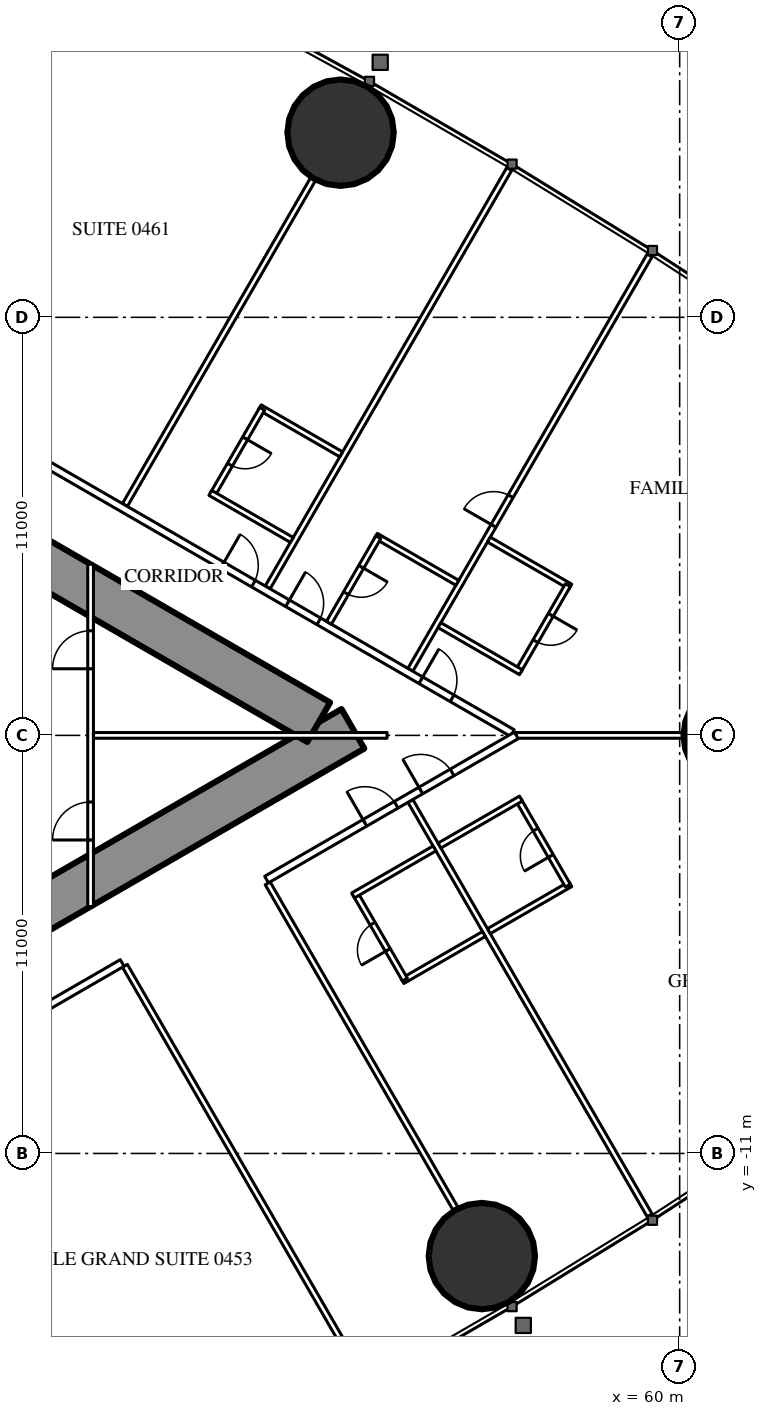
"""IFC4 building model, lengths in metres.
Left out: names, types, materials, properties, quantities, classifications, styles, units other than length and angle.
Written with IfcOpenShell. Run it as: python <this file> out.ifc"""

import sys

from ifc_helpers import new_model, si_unit, direction, frame, frame_2d, origin, origin_2d, place, context, subcontext, project, spatial, rectangle, hollow_circle, extrude, element, fill, save


model = new_model("IFC4")
c1 = context("Model", 3, precision=1e-05, world=origin(), true_north=direction((0.0, 1.0)))
c2 = subcontext(c1, "Body", "Model", "MODEL_VIEW")
j1 = project(units=[si_unit("LENGTHUNIT", "METRE"), si_unit("PLANEANGLEUNIT", "RADIAN")], contexts=[c1])
p1 = place(None, origin())
s1 = spatial("IfcSite", under=j1, at=p1, CompositionType="ELEMENT")
p2 = place(p1, origin())
s2 = spatial("IfcBuilding", under=s1, at=p2, CompositionType="ELEMENT")
p3 = place(p2, frame((0.0, 0.0, 21.5)))
s3 = spatial("IfcBuildingStorey", under=s2, at=p3, CompositionType="ELEMENT", Elevation=21.5)
for number, where, z_axis, x_axis in (
    (1, (51.078, 15.858, 0.0), (0.0, 0.0, 1.0), (1.0, 0.0, 0.0)),
    (2, (54.795, -13.701, 0.0), (0.0, 0.0, 1.0), (1.0, 0.0, 0.0)),
):
    element("IfcColumn", number, at=place(p3, frame(where, z_axis=z_axis, x_axis=x_axis)), inside=s3, PredefinedType="COLUMN", context=c2, shape_type="SweptSolid", body=[
        extrude(hollow_circle(Radius=1.4, WallThickness=0.12, at=origin_2d()), origin(), (0.0, 0.0, 1.0), 3.5),
    ])
p4 = place(p3, frame((61.5, 0.0, 0.0), z_axis=(0.0, 0.0, 1.0), x_axis=(1.0, 0.0, 0.0)))
e3 = element("IfcColumn", 3, at=p4, inside=s3, PredefinedType="COLUMN", context=c2, shape_type="SweptSolid", body=[
    extrude(hollow_circle(Radius=1.4, WallThickness=0.1, at=origin_2d()), origin(), (0.0, 0.0, 1.0), 3.5),
])
p5 = place(p3, frame((27.2, -13.8, 0.0), z_axis=(0.0, 0.0, 1.0), x_axis=(0.866027159892, 0.499996958321, 0.0)))
e4 = element("IfcWall", 4, at=p5, inside=s3, PredefinedType="SHEAR", context=c2, shape_type="SweptSolid", body=[
    extrude(rectangle(XDim=27.947, YDim=1.2, at=frame_2d((13.973, 0.0))), origin(), (0.0, 0.0, 1.0), 3.5),
])
p6 = place(p5, frame((4.6, 0.0, 0.0)))
e5 = element("IfcOpeningElement", 5, at=p6, cuts=e4, PredefinedType="OPENING", context=c2, shape_type="SweptSolid", body=[
    extrude(rectangle(XDim=1.0, YDim=2.2, at=frame_2d((0.5, 1.1))), frame((0.0, 0.61, 0.0), z_axis=(0.0, -1.0, 0.0), x_axis=(1.0, 0.0, 0.0)), (0.0, 0.0, 1.0), 1.22),
])
p7 = place(p5, frame((13.395, 0.0, 0.0)))
e6 = element("IfcOpeningElement", 6, at=p7, cuts=e4, PredefinedType="OPENING", context=c2, shape_type="SweptSolid", body=[
    extrude(rectangle(XDim=1.8, YDim=2.2, at=frame_2d((0.9, 1.1))), frame((0.0, 0.61, 0.0), z_axis=(0.0, -1.0, 0.0), x_axis=(1.0, 0.0, 0.0)), (0.0, 0.0, 1.0), 1.22),
])
p8 = place(p3, frame((27.2, 13.8, 0.0), z_axis=(0.0, 0.0, 1.0), x_axis=(0.866024515034, -0.500001539357, 0.0)))
e7 = element("IfcWall", 7, at=p8, inside=s3, PredefinedType="SHEAR", context=c2, shape_type="SweptSolid", body=[
    extrude(rectangle(XDim=26.907, YDim=1.2, at=frame_2d((13.454, 0.0))), origin(), (0.0, 0.0, 1.0), 3.5),
])
p9 = place(p8, frame((4.6, 0.0, 0.0)))
e8 = element("IfcOpeningElement", 8, at=p9, cuts=e7, PredefinedType="OPENING", context=c2, shape_type="SweptSolid", body=[
    extrude(rectangle(XDim=1.0, YDim=2.2, at=frame_2d((0.5, 1.1))), frame((0.0, 0.61, 0.0), z_axis=(0.0, -1.0, 0.0), x_axis=(1.0, 0.0, 0.0)), (0.0, 0.0, 1.0), 1.22),
])
p10 = place(p8, frame((13.395, 0.0, 0.0)))
e9 = element("IfcOpeningElement", 9, at=p10, cuts=e7, PredefinedType="OPENING", context=c2, shape_type="SweptSolid", body=[
    extrude(rectangle(XDim=1.8, YDim=2.2, at=frame_2d((0.9, 1.1))), frame((0.0, 0.61, 0.0), z_axis=(0.0, -1.0, 0.0), x_axis=(1.0, 0.0, 0.0)), (0.0, 0.0, 1.0), 1.22),
])
p11 = place(p3, frame((45.403, -6.062, 0.0), z_axis=(0.0, 0.0, 1.0), x_axis=(0.500007077968, -0.866021317279, 0.0)))
e10 = element("IfcWall", 10, at=p11, inside=s3, PredefinedType="PARTITIONING", context=c2, shape_type="SweptSolid", body=[
    extrude(rectangle(XDim=12.721, YDim=0.15, at=frame_2d((6.361, 0.0))), origin(), (0.0, 0.0, 1.0), 3.25),
])
p12 = place(p3, frame((49.159, -3.893, 0.0), z_axis=(0.0, 0.0, 1.0), x_axis=(0.499998773722, -0.866026111775, 0.0)))
e11 = element("IfcWall", 11, at=p12, inside=s3, PredefinedType="PARTITIONING", context=c2, shape_type="SweptSolid", body=[
    extrude(rectangle(XDim=9.892, YDim=0.15, at=frame_2d((4.946, 0.0))), origin(), (0.0, 0.0, 1.0), 2.25),
])
p13 = place(p3, frame((52.915, -1.725, 0.0), z_axis=(0.0, 0.0, 1.0), x_axis=(0.499997163113, -0.866027041656, 0.0)))
e12 = element("IfcWall", 12, at=p13, inside=s3, PredefinedType="PARTITIONING", context=c2, shape_type="SweptSolid", body=[
    extrude(rectangle(XDim=12.591, YDim=0.15, at=frame_2d((6.295, 0.0))), origin(), (0.0, 0.0, 1.0), 3.25),
])
p14 = place(p3, frame((45.403, 6.062, 0.0), z_axis=(0.0, 0.0, 1.0), x_axis=(0.500013434677, 0.866017647131, 0.0)))
e13 = element("IfcWall", 13, at=p14, inside=s3, PredefinedType="PARTITIONING", context=c2, shape_type="SweptSolid", body=[
    extrude(rectangle(XDim=9.902, YDim=0.15, at=frame_2d((4.951, 0.0))), origin(), (0.0, 0.0, 1.0), 2.25),
])
p15 = place(p3, frame((49.159, 3.893, 0.0), z_axis=(0.0, 0.0, 1.0), x_axis=(0.499995664361, 0.866027906952, 0.0)))
e14 = element("IfcWall", 14, at=p15, inside=s3, PredefinedType="PARTITIONING", context=c2, shape_type="SweptSolid", body=[
    extrude(rectangle(XDim=12.711, YDim=0.15, at=frame_2d((6.356, 0.0))), origin(), (0.0, 0.0, 1.0), 3.25),
])
p16 = place(p3, frame((52.915, 1.725, 0.0), z_axis=(0.0, 0.0, 1.0), x_axis=(0.499997163113, 0.866027041656, 0.0)))
e15 = element("IfcWall", 15, at=p16, inside=s3, PredefinedType="PARTITIONING", context=c2, shape_type="SweptSolid", body=[
    extrude(rectangle(XDim=12.591, YDim=0.15, at=frame_2d((6.295, 0.0))), origin(), (0.0, 0.0, 1.0), 3.25),
])
p17 = place(p16, frame((4.375, 0.0, 0.0)))
e16 = element("IfcOpeningElement", 16, at=p17, cuts=e15, PredefinedType="OPENING", context=c2, shape_type="SweptSolid", body=[
    extrude(rectangle(XDim=0.9, YDim=2.2, at=frame_2d((0.45, 1.1))), frame((0.0, 0.085, 0.0), z_axis=(0.0, -1.0, 0.0), x_axis=(1.0, 0.0, 0.0)), (0.0, 0.0, 1.0), 0.17),
])
p18 = place(p3, frame((55.702, 0.0, 0.0), z_axis=(0.0, 0.0, 1.0), x_axis=(1.0, 0.0, 0.0)))
e17 = element("IfcWall", 17, at=p18, inside=s3, PredefinedType="PARTITIONING", context=c2, shape_type="SweptSolid", body=[
    extrude(rectangle(XDim=16.117, YDim=0.15, at=frame_2d((8.059, 0.0))), origin(), (0.0, 0.0, 1.0), 2.25),
])
p19 = place(p3, frame((36.834, 10.894, 0.0), z_axis=(0.0, 0.0, 1.0), x_axis=(0.866028157229, -0.499995230863, 0.0)))
e18 = element("IfcWall", 18, at=p19, inside=s3, PredefinedType="PARTITIONING", context=c2, shape_type="SweptSolid", body=[
    extrude(rectangle(XDim=21.667, YDim=0.2, at=frame_2d((10.833, 0.0))), origin(), (0.0, 0.0, 1.0), 3.25),
])
p20 = place(p19, frame((18.885, 0.0, 0.0)))
e19 = element("IfcOpeningElement", 19, at=p20, cuts=e18, PredefinedType="OPENING", context=c2, shape_type="SweptSolid", body=[
    extrude(rectangle(XDim=0.95, YDim=2.2, at=frame_2d((0.475, 1.1))), frame((0.0, 0.11, 0.0), z_axis=(0.0, -1.0, 0.0), x_axis=(1.0, 0.0, 0.0)), (0.0, 0.0, 1.0), 0.22),
])
p21 = place(p19, frame((14.835, 0.0, 0.0)))
e20 = element("IfcOpeningElement", 20, at=p21, cuts=e18, PredefinedType="OPENING", context=c2, shape_type="SweptSolid", body=[
    extrude(rectangle(XDim=0.95, YDim=2.2, at=frame_2d((0.475, 1.1))), frame((0.0, 0.11, 0.0), z_axis=(0.0, -1.0, 0.0), x_axis=(1.0, 0.0, 0.0)), (0.0, 0.0, 1.0), 0.22),
])
p22 = place(p19, frame((12.85, 0.0, 0.0)))
e21 = element("IfcOpeningElement", 21, at=p22, cuts=e18, PredefinedType="OPENING", context=c2, shape_type="SweptSolid", body=[
    extrude(rectangle(XDim=0.95, YDim=2.2, at=frame_2d((0.475, 1.1))), frame((0.0, 0.11, 0.0), z_axis=(0.0, -1.0, 0.0), x_axis=(1.0, 0.0, 0.0)), (0.0, 0.0, 1.0), 0.22),
])
p23 = place(p19, frame((1.542, 0.0, 0.0)))
e22 = element("IfcOpeningElement", 22, at=p23, cuts=e18, PredefinedType="OPENING", context=c2, shape_type="SweptSolid", body=[
    extrude(rectangle(XDim=0.95, YDim=2.2, at=frame_2d((0.475, 1.1))), frame((0.0, 0.11, 0.0), z_axis=(0.0, -1.0, 0.0), x_axis=(1.0, 0.0, 0.0)), (0.0, 0.0, 1.0), 0.22),
])
p24 = place(p3, frame((37.96, -10.243, 0.0), z_axis=(0.0, 0.0, 1.0), x_axis=(0.866024617314, 0.500001362204, 0.0)))
e23 = element("IfcWall", 23, at=p24, inside=s3, PredefinedType="PARTITIONING", context=c2, shape_type="SweptSolid", body=[
    extrude(rectangle(XDim=8.512, YDim=0.2, at=frame_2d((4.256, 0.0))), origin(), (0.0, 0.0, 1.0), 3.25),
])
p25 = place(p24, frame((3.35, 0.0, 0.0)))
e24 = element("IfcOpeningElement", 24, at=p25, cuts=e23, PredefinedType="OPENING", context=c2, shape_type="SweptSolid", body=[
    extrude(rectangle(XDim=1.0, YDim=2.2, at=frame_2d((0.5, 1.1))), frame((0.0, 0.11, 0.0), z_axis=(0.0, -1.0, 0.0), x_axis=(1.0, 0.0, 0.0)), (0.0, 0.0, 1.0), 0.22),
])
p26 = place(p3, frame((49.131, -3.794, 0.0), z_axis=(0.0, 0.0, 1.0), x_axis=(0.866030732979, 0.499990769451, 0.0)))
e25 = element("IfcWall", 25, at=p26, inside=s3, PredefinedType="PARTITIONING", context=c2, shape_type="SweptSolid", body=[
    extrude(rectangle(XDim=7.588, YDim=0.2, at=frame_2d((3.794, 0.0))), origin(), (0.0, 0.0, 1.0), 3.25),
])
p27 = place(p26, frame((2.986, 0.0, 0.0)))
e26 = element("IfcOpeningElement", 26, at=p27, cuts=e25, PredefinedType="OPENING", context=c2, shape_type="SweptSolid", body=[
    extrude(rectangle(XDim=0.95, YDim=2.2, at=frame_2d((0.475, 1.1))), frame((0.0, 0.11, 0.0), z_axis=(0.0, -1.0, 0.0), x_axis=(1.0, 0.0, 0.0)), (0.0, 0.0, 1.0), 0.22),
])
p28 = place(p26, frame((4.686, 0.0, 0.0)))
e27 = element("IfcOpeningElement", 27, at=p28, cuts=e25, PredefinedType="OPENING", context=c2, shape_type="SweptSolid", body=[
    extrude(rectangle(XDim=0.95, YDim=2.2, at=frame_2d((0.475, 1.1))), frame((0.0, 0.11, 0.0), z_axis=(0.0, -1.0, 0.0), x_axis=(1.0, 0.0, 0.0)), (0.0, 0.0, 1.0), 0.22),
])
p29 = place(p3, frame((52.706, -6.464, 0.0), z_axis=(0.0, 0.0, 1.0), x_axis=(0.86604923931, 0.499958713387, 0.0)))
e28 = element("IfcWall", 28, at=p29, inside=s3, PredefinedType="PARTITIONING", context=c2, shape_type="SweptSolid", body=[
    extrude(rectangle(XDim=2.475, YDim=0.15, at=frame_2d((1.237, 0.0))), origin(), (0.0, 0.0, 1.0), 3.25),
])
p30 = place(p3, frame((51.471, -4.175, 0.0), z_axis=(0.0, 0.0, 1.0), x_axis=(0.500006934395, -0.866021400173, 0.0)))
e29 = element("IfcWall", 29, at=p30, inside=s3, PredefinedType="PARTITIONING", context=c2, shape_type="SweptSolid", body=[
    extrude(rectangle(XDim=2.6, YDim=0.15, at=frame_2d((1.3, 0.0))), origin(), (0.0, 0.0, 1.0), 3.25),
])
p31 = place(p30, frame((0.9, 0.0, 0.0)))
e30 = element("IfcOpeningElement", 30, at=p31, cuts=e29, PredefinedType="OPENING", context=c2, shape_type="SweptSolid", body=[
    extrude(rectangle(XDim=0.8, YDim=2.2, at=frame_2d((0.4, 1.1))), frame((0.0, 0.085, 0.0), z_axis=(0.0, -1.0, 0.0), x_axis=(1.0, 0.0, 0.0)), (0.0, 0.0, 1.0), 0.17),
])
p32 = place(p3, frame((51.406, -4.212, 0.0), z_axis=(0.0, 0.0, 1.0), x_axis=(0.866031185235, 0.4999899861, 0.0)))
e31 = element("IfcWall", 31, at=p32, inside=s3, PredefinedType="PARTITIONING", context=c2, shape_type="SweptSolid", body=[
    extrude(rectangle(XDim=2.475, YDim=0.15, at=frame_2d((1.238, 0.0))), origin(), (0.0, 0.0, 1.0), 3.25),
])
p33 = place(p3, frame((54.98, -5.151, 0.0), z_axis=(0.0, 0.0, 1.0), x_axis=(0.86604923931, 0.499958713387, 0.0)))
e32 = element("IfcWall", 32, at=p33, inside=s3, PredefinedType="PARTITIONING", context=c2, shape_type="SweptSolid", body=[
    extrude(rectangle(XDim=2.475, YDim=0.15, at=frame_2d((1.237, 0.0))), origin(), (0.0, 0.0, 1.0), 3.25),
])
p34 = place(p3, frame((55.758, -1.7, 0.0), z_axis=(0.0, 0.0, 1.0), x_axis=(0.500006934395, -0.866021400173, 0.0)))
e33 = element("IfcWall", 33, at=p34, inside=s3, PredefinedType="PARTITIONING", context=c2, shape_type="SweptSolid", body=[
    extrude(rectangle(XDim=2.6, YDim=0.15, at=frame_2d((1.3, 0.0))), origin(), (0.0, 0.0, 1.0), 3.25),
])
p35 = place(p34, frame((0.9, 0.0, 0.0)))
e34 = element("IfcOpeningElement", 34, at=p35, cuts=e33, PredefinedType="OPENING", context=c2, shape_type="SweptSolid", body=[
    extrude(rectangle(XDim=0.8, YDim=2.2, at=frame_2d((0.4, 1.1))), frame((0.0, 0.085, 0.0), z_axis=(0.0, -1.0, 0.0), x_axis=(1.0, 0.0, 0.0)), (0.0, 0.0, 1.0), 0.17),
])
for number, where, z_axis, x_axis in (
    (35, (53.68, -2.9, 0.0), (0.0, 0.0, 1.0), (0.866, 0.5, 0.0)),
    (36, (54.98, 5.151, 0.0), (0.0, 0.0, 1.0), (0.866, -0.5, 0.0)),
):
    element("IfcWall", number, at=place(p3, frame(where, z_axis=z_axis, x_axis=x_axis)), inside=s3, PredefinedType="PARTITIONING", context=c2, shape_type="SweptSolid", body=[
        extrude(rectangle(XDim=2.475, YDim=0.15, at=frame_2d((1.237, 0.0))), origin(), (0.0, 0.0, 1.0), 3.25),
    ])
p36 = place(p3, frame((55.758, 1.7, 0.0), z_axis=(0.0, 0.0, 1.0), x_axis=(0.500006934395, 0.866021400173, 0.0)))
e37 = element("IfcWall", 37, at=p36, inside=s3, PredefinedType="PARTITIONING", context=c2, shape_type="SweptSolid", body=[
    extrude(rectangle(XDim=2.6, YDim=0.15, at=frame_2d((1.3, 0.0))), origin(), (0.0, 0.0, 1.0), 3.25),
])
p37 = place(p36, frame((0.9, 0.0, 0.0)))
e38 = element("IfcOpeningElement", 38, at=p37, cuts=e37, PredefinedType="OPENING", context=c2, shape_type="SweptSolid", body=[
    extrude(rectangle(XDim=0.8, YDim=2.2, at=frame_2d((0.4, 1.1))), frame((0.0, 0.085, 0.0), z_axis=(0.0, -1.0, 0.0), x_axis=(1.0, 0.0, 0.0)), (0.0, 0.0, 1.0), 0.17),
])
for number, where, z_axis, x_axis in (
    (39, (53.68, 2.9, 0.0), (0.0, 0.0, 1.0), (0.866, -0.5, 0.0)),
    (40, (52.006, 5.251, 0.0), (0.0, 0.0, 1.0), (0.866, -0.5, 0.0)),
):
    element("IfcWall", number, at=place(p3, frame(where, z_axis=z_axis, x_axis=x_axis)), inside=s3, PredefinedType="PARTITIONING", context=c2, shape_type="SweptSolid", body=[
        extrude(rectangle(XDim=2.475, YDim=0.15, at=frame_2d((1.237, 0.0))), origin(), (0.0, 0.0, 1.0), 3.25),
    ])
p38 = place(p3, frame((50.771, 2.962, 0.0), z_axis=(0.0, 0.0, 1.0), x_axis=(0.500006934395, 0.866021400173, 0.0)))
e41 = element("IfcWall", 41, at=p38, inside=s3, PredefinedType="PARTITIONING", context=c2, shape_type="SweptSolid", body=[
    extrude(rectangle(XDim=2.6, YDim=0.15, at=frame_2d((1.3, 0.0))), origin(), (0.0, 0.0, 1.0), 3.25),
])
p39 = place(p38, frame((0.9, 0.0, 0.0)))
e42 = element("IfcOpeningElement", 42, at=p39, cuts=e41, PredefinedType="OPENING", context=c2, shape_type="SweptSolid", body=[
    extrude(rectangle(XDim=0.8, YDim=2.2, at=frame_2d((0.4, 1.1))), frame((0.0, 0.085, 0.0), z_axis=(0.0, -1.0, 0.0), x_axis=(1.0, 0.0, 0.0)), (0.0, 0.0, 1.0), 0.17),
])
p40 = place(p3, frame((48.951, 8.632, 0.0), z_axis=(0.0, 0.0, 1.0), x_axis=(0.866006523861, -0.500032699561, 0.0)))
e43 = element("IfcWall", 43, at=p40, inside=s3, PredefinedType="PARTITIONING", context=c2, shape_type="SweptSolid", body=[
    extrude(rectangle(XDim=2.475, YDim=0.15, at=frame_2d((1.237, 0.0))), origin(), (0.0, 0.0, 1.0), 3.25),
])
p41 = place(p3, frame((47.716, 6.343, 0.0), z_axis=(0.0, 0.0, 1.0), x_axis=(0.500006934395, 0.866021400173, 0.0)))
e44 = element("IfcWall", 44, at=p41, inside=s3, PredefinedType="PARTITIONING", context=c2, shape_type="SweptSolid", body=[
    extrude(rectangle(XDim=2.6, YDim=0.15, at=frame_2d((1.3, 0.0))), origin(), (0.0, 0.0, 1.0), 3.25),
])
p42 = place(p41, frame((0.9, 0.0, 0.0)))
e45 = element("IfcOpeningElement", 45, at=p42, cuts=e44, PredefinedType="OPENING", context=c2, shape_type="SweptSolid", body=[
    extrude(rectangle(XDim=0.8, YDim=2.2, at=frame_2d((0.4, 1.1))), frame((0.0, 0.085, 0.0), z_axis=(0.0, -1.0, 0.0), x_axis=(1.0, 0.0, 0.0)), (0.0, 0.0, 1.0), 0.17),
])
p43 = place(p3, frame((47.651, 6.38, 0.0), z_axis=(0.0, 0.0, 1.0), x_axis=(0.866031185235, -0.4999899861, 0.0)))
e46 = element("IfcWall", 46, at=p43, inside=s3, PredefinedType="PARTITIONING", context=c2, shape_type="SweptSolid", body=[
    extrude(rectangle(XDim=2.475, YDim=0.15, at=frame_2d((1.238, 0.0))), origin(), (0.0, 0.0, 1.0), 3.25),
])
p44 = place(p3, frame((44.5, -4.505, 0.0), z_axis=(0.0, 0.0, 1.0), x_axis=(0.0, 1.0, 0.0)))
e47 = element("IfcWall", 47, at=p44, inside=s3, PredefinedType="PARTITIONING", context=c2, shape_type="SweptSolid", body=[
    extrude(rectangle(XDim=9.009, YDim=0.15, at=frame_2d((4.505, 0.0))), origin(), (0.0, 0.0, 1.0), 2.45),
])
p45 = place(p44, frame((1.752, 0.0, 0.0)))
e48 = element("IfcOpeningElement", 48, at=p45, cuts=e47, PredefinedType="OPENING", context=c2, shape_type="SweptSolid", body=[
    extrude(rectangle(XDim=1.0, YDim=2.2, at=frame_2d((0.5, 1.1))), frame((0.0, 0.085, 0.0), z_axis=(0.0, -1.0, 0.0), x_axis=(1.0, 0.0, 0.0)), (0.0, 0.0, 1.0), 0.17),
])
p46 = place(p44, frame((6.257, 0.0, 0.0)))
e49 = element("IfcOpeningElement", 49, at=p46, cuts=e47, PredefinedType="OPENING", context=c2, shape_type="SweptSolid", body=[
    extrude(rectangle(XDim=1.0, YDim=2.2, at=frame_2d((0.5, 1.1))), frame((0.0, 0.085, 0.0), z_axis=(0.0, -1.0, 0.0), x_axis=(1.0, 0.0, 0.0)), (0.0, 0.0, 1.0), 0.17),
])
p47 = place(p3, frame((44.575, 0.0, 0.0), z_axis=(0.0, 0.0, 1.0), x_axis=(1.0, 0.0, 0.0)))
e50 = element("IfcWall", 50, at=p47, inside=s3, PredefinedType="PARTITIONING", context=c2, shape_type="SweptSolid", body=[
    extrude(rectangle(XDim=7.727, YDim=0.15, at=frame_2d((3.864, 0.0))), origin(), (0.0, 0.0, 1.0), 2.25),
])
p48 = place(p31, origin())
e51 = element("IfcDoor", 51, at=p48, inside=s3, OperationType="SINGLE_SWING_RIGHT", PredefinedType="DOOR", context=c2, shape_type="SweptSolid", body=[
    extrude(rectangle(XDim=0.8, YDim=2.2, at=frame_2d((0.4, 1.1))), frame((0.0, 0.025, 0.0), z_axis=(0.0, -1.0, 0.0), x_axis=(1.0, 0.0, 0.0)), (0.0, 0.0, 1.0), 0.05),
])
fill(e30, e51)
p49 = place(p27, origin())
e52 = element("IfcDoor", 52, at=p49, inside=s3, OperationType="SINGLE_SWING_LEFT", PredefinedType="DOOR", context=c2, shape_type="SweptSolid", body=[
    extrude(rectangle(XDim=0.95, YDim=2.2, at=frame_2d((0.475, 1.1))), frame((0.0, 0.025, 0.0), z_axis=(0.0, -1.0, 0.0), x_axis=(1.0, 0.0, 0.0)), (0.0, 0.0, 1.0), 0.05),
])
fill(e26, e52)
p50 = place(p35, origin())
e53 = element("IfcDoor", 53, at=p50, inside=s3, OperationType="SINGLE_SWING_RIGHT", PredefinedType="DOOR", context=c2, shape_type="SweptSolid", body=[
    extrude(rectangle(XDim=0.8, YDim=2.2, at=frame_2d((0.4, 1.1))), frame((0.0, 0.025, 0.0), z_axis=(0.0, -1.0, 0.0), x_axis=(1.0, 0.0, 0.0)), (0.0, 0.0, 1.0), 0.05),
])
fill(e34, e53)
p51 = place(p28, origin())
e54 = element("IfcDoor", 54, at=p51, inside=s3, OperationType="SINGLE_SWING_LEFT", PredefinedType="DOOR", context=c2, shape_type="SweptSolid", body=[
    extrude(rectangle(XDim=0.95, YDim=2.2, at=frame_2d((0.475, 1.1))), frame((0.0, 0.025, 0.0), z_axis=(0.0, -1.0, 0.0), x_axis=(1.0, 0.0, 0.0)), (0.0, 0.0, 1.0), 0.05),
])
fill(e27, e54)
p52 = place(p37, origin())
e55 = element("IfcDoor", 55, at=p52, inside=s3, OperationType="SINGLE_SWING_RIGHT", PredefinedType="DOOR", context=c2, shape_type="SweptSolid", body=[
    extrude(rectangle(XDim=0.8, YDim=2.2, at=frame_2d((0.4, 1.1))), frame((0.0, 0.025, 0.0), z_axis=(0.0, -1.0, 0.0), x_axis=(1.0, 0.0, 0.0)), (0.0, 0.0, 1.0), 0.05),
])
fill(e38, e55)
p53 = place(p20, origin())
e56 = element("IfcDoor", 56, at=p53, inside=s3, OperationType="SINGLE_SWING_LEFT", PredefinedType="DOOR", context=c2, shape_type="SweptSolid", body=[
    extrude(rectangle(XDim=0.95, YDim=2.2, at=frame_2d((0.475, 1.1))), frame((0.0, 0.025, 0.0), z_axis=(0.0, -1.0, 0.0), x_axis=(1.0, 0.0, 0.0)), (0.0, 0.0, 1.0), 0.05),
])
fill(e19, e56)
p54 = place(p39, origin())
e57 = element("IfcDoor", 57, at=p54, inside=s3, OperationType="SINGLE_SWING_RIGHT", PredefinedType="DOOR", context=c2, shape_type="SweptSolid", body=[
    extrude(rectangle(XDim=0.8, YDim=2.2, at=frame_2d((0.4, 1.1))), frame((0.0, 0.025, 0.0), z_axis=(0.0, -1.0, 0.0), x_axis=(1.0, 0.0, 0.0)), (0.0, 0.0, 1.0), 0.05),
])
fill(e42, e57)
p55 = place(p21, origin())
e58 = element("IfcDoor", 58, at=p55, inside=s3, OperationType="SINGLE_SWING_LEFT", PredefinedType="DOOR", context=c2, shape_type="SweptSolid", body=[
    extrude(rectangle(XDim=0.95, YDim=2.2, at=frame_2d((0.475, 1.1))), frame((0.0, 0.025, 0.0), z_axis=(0.0, -1.0, 0.0), x_axis=(1.0, 0.0, 0.0)), (0.0, 0.0, 1.0), 0.05),
])
fill(e20, e58)
p56 = place(p42, origin())
e59 = element("IfcDoor", 59, at=p56, inside=s3, OperationType="SINGLE_SWING_RIGHT", PredefinedType="DOOR", context=c2, shape_type="SweptSolid", body=[
    extrude(rectangle(XDim=0.8, YDim=2.2, at=frame_2d((0.4, 1.1))), frame((0.0, 0.025, 0.0), z_axis=(0.0, -1.0, 0.0), x_axis=(1.0, 0.0, 0.0)), (0.0, 0.0, 1.0), 0.05),
])
fill(e45, e59)
p57 = place(p22, origin())
e60 = element("IfcDoor", 60, at=p57, inside=s3, OperationType="SINGLE_SWING_LEFT", PredefinedType="DOOR", context=c2, shape_type="SweptSolid", body=[
    extrude(rectangle(XDim=0.95, YDim=2.2, at=frame_2d((0.475, 1.1))), frame((0.0, 0.025, 0.0), z_axis=(0.0, -1.0, 0.0), x_axis=(1.0, 0.0, 0.0)), (0.0, 0.0, 1.0), 0.05),
])
fill(e21, e60)
p58 = place(p17, origin())
e61 = element("IfcDoor", 61, at=p58, inside=s3, OperationType="SINGLE_SWING_LEFT", PredefinedType="DOOR", context=c2, shape_type="SweptSolid", body=[
    extrude(rectangle(XDim=0.9, YDim=2.2, at=frame_2d((0.45, 1.1))), frame((0.0, 0.025, 0.0), z_axis=(0.0, -1.0, 0.0), x_axis=(1.0, 0.0, 0.0)), (0.0, 0.0, 1.0), 0.05),
])
fill(e16, e61)
p59 = place(p45, origin())
e62 = element("IfcDoor", 62, at=p59, inside=s3, OperationType="SINGLE_SWING_LEFT", PredefinedType="DOOR", context=c2, shape_type="SweptSolid", body=[
    extrude(rectangle(XDim=1.0, YDim=2.2, at=frame_2d((0.5, 1.1))), frame((0.0, 0.025, 0.0), z_axis=(0.0, -1.0, 0.0), x_axis=(1.0, 0.0, 0.0)), (0.0, 0.0, 1.0), 0.05),
])
fill(e48, e62)
p60 = place(p46, origin())
e63 = element("IfcDoor", 63, at=p60, inside=s3, OperationType="SINGLE_SWING_LEFT", PredefinedType="DOOR", context=c2, shape_type="SweptSolid", body=[
    extrude(rectangle(XDim=1.0, YDim=2.2, at=frame_2d((0.5, 1.1))), frame((0.0, 0.025, 0.0), z_axis=(0.0, -1.0, 0.0), x_axis=(1.0, 0.0, 0.0)), (0.0, 0.0, 1.0), 0.05),
])
fill(e49, e63)
save(model, sys.argv[1])
